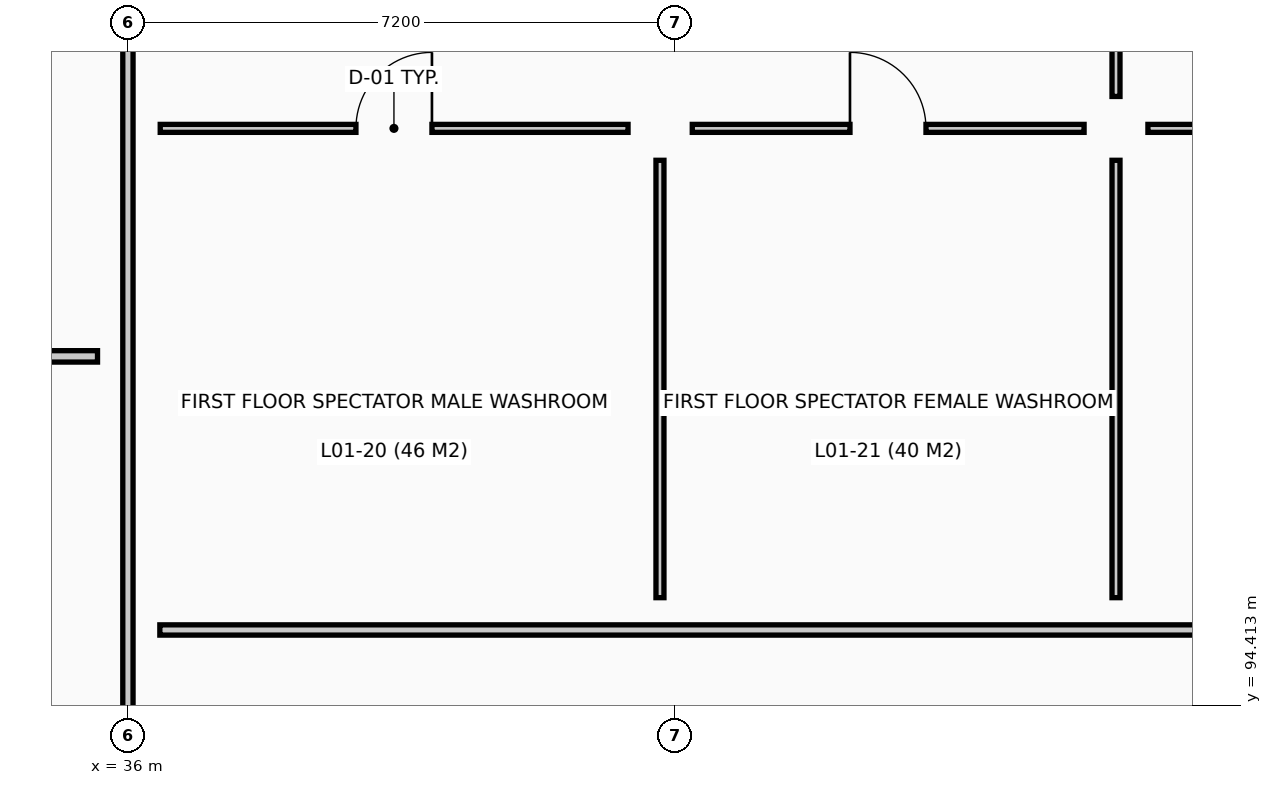
"""IFC4 building model, lengths in metres.
Left out: names, types, materials, properties, quantities, classifications, styles, units other than length and angle.
Written with IfcOpenShell. Run it as: python <this file> out.ifc"""

import sys

from ifc_helpers import new_model, si_unit, direction, frame, frame_2d, origin, place, context, subcontext, project, spatial, rectangle, extrude, element, fill, save


model = new_model("IFC4")
c1 = context("Model", 3, precision=1e-05, world=origin(), true_north=direction((0.0, 1.0)))
c2 = subcontext(c1, "Body", "Model", "MODEL_VIEW")
j1 = project(units=[si_unit("LENGTHUNIT", "METRE"), si_unit("PLANEANGLEUNIT", "RADIAN")], contexts=[c1])
p1 = place(None, origin())
s1 = spatial("IfcSite", under=j1, at=p1, CompositionType="ELEMENT")
p2 = place(p1, origin())
s2 = spatial("IfcBuilding", under=s1, at=p2, CompositionType="ELEMENT")
p3 = place(p2, frame((0.0, 0.0, 4.8)))
s3 = spatial("IfcBuildingStorey", under=s2, at=p3, CompositionType="ELEMENT", Elevation=4.8)
p4 = place(p3, frame((36.0, 90.82, 0.0), z_axis=(0.0, 0.0, 1.0), x_axis=(0.0, 1.0, 0.0)))
e1 = element("IfcWall", 1, at=p4, inside=s3, PredefinedType="PARTITIONING", context=c2, shape_type="SweptSolid", body=[
    extrude(rectangle(XDim=18.76, YDim=0.135, at=frame_2d((9.38, 0.0))), origin(), (0.0, 0.0, 1.0), 3.89),
])
p5 = place(p3, frame((36.42, 95.4, 0.0), z_axis=(0.0, 0.0, 1.0), x_axis=(1.0, 0.0, 0.0)))
e2 = element("IfcWall", 2, at=p5, inside=s3, PredefinedType="PARTITIONING", context=c2, shape_type="SweptSolid", body=[
    extrude(rectangle(XDim=15.16, YDim=0.135, at=frame_2d((7.58, 0.0))), origin(), (0.0, 0.0, 1.0), 4.545),
])
p6 = place(p3, frame((36.425, 102.0, 0.0), z_axis=(0.0, 0.0, 1.0), x_axis=(1.0, 0.0, 0.0)))
e3 = element("IfcWall", 3, at=p6, inside=s3, PredefinedType="PARTITIONING", context=c2, shape_type="SweptSolid", body=[
    extrude(rectangle(XDim=6.155, YDim=0.105, at=frame_2d((3.078, 0.0))), origin(), (0.0, 0.0, 1.0), 4.545),
])
p7 = place(p6, frame((2.575, 0.0, 0.0)))
e4 = element("IfcOpeningElement", 4, at=p7, cuts=e3, PredefinedType="OPENING", context=c2, shape_type="SweptSolid", body=[
    extrude(rectangle(XDim=1.0, YDim=2.1, at=frame_2d((0.5, 1.05))), frame((0.0, 0.062, 0.0), z_axis=(0.0, -1.0, 0.0), x_axis=(1.0, 0.0, 0.0)), (0.0, 0.0, 1.0), 0.125),
])
p8 = place(p3, frame((43.0, 95.825, 0.0), z_axis=(0.0, 0.0, 1.0), x_axis=(0.0, 1.0, 0.0)))
e5 = element("IfcWall", 5, at=p8, inside=s3, PredefinedType="PARTITIONING", context=c2, shape_type="SweptSolid", body=[
    extrude(rectangle(XDim=5.755, YDim=0.105, at=frame_2d((2.877, 0.0))), origin(), (0.0, 0.0, 1.0), 3.89),
])
p9 = place(p3, frame((43.425, 102.0, 0.0), z_axis=(0.0, 0.0, 1.0), x_axis=(1.0, 0.0, 0.0)))
e6 = element("IfcWall", 6, at=p9, inside=s3, PredefinedType="PARTITIONING", context=c2, shape_type="SweptSolid", body=[
    extrude(rectangle(XDim=5.155, YDim=0.105, at=frame_2d((2.578, 0.0))), origin(), (0.0, 0.0, 1.0), 4.545),
])
p10 = place(p9, frame((2.075, 0.0, 0.0)))
e7 = element("IfcOpeningElement", 7, at=p10, cuts=e6, PredefinedType="OPENING", context=c2, shape_type="SweptSolid", body=[
    extrude(rectangle(XDim=1.0, YDim=2.1, at=frame_2d((0.5, 1.05))), frame((0.0, 0.062, 0.0), z_axis=(0.0, -1.0, 0.0), x_axis=(1.0, 0.0, 0.0)), (0.0, 0.0, 1.0), 0.125),
])
p11 = place(p3, frame((49.0, 95.825, 0.0), z_axis=(0.0, 0.0, 1.0), x_axis=(0.0, 1.0, 0.0)))
e8 = element("IfcWall", 8, at=p11, inside=s3, PredefinedType="PARTITIONING", context=c2, shape_type="SweptSolid", body=[
    extrude(rectangle(XDim=5.755, YDim=0.105, at=frame_2d((2.877, 0.0))), origin(), (0.0, 0.0, 1.0), 4.545),
])
p12 = place(p3, frame((49.42, 102.0, 0.0), z_axis=(0.0, 0.0, 1.0), x_axis=(1.0, 0.0, 0.0)))
e9 = element("IfcWall", 9, at=p12, inside=s3, PredefinedType="PARTITIONING", context=c2, shape_type="SweptSolid", body=[
    extrude(rectangle(XDim=2.56, YDim=0.105, at=frame_2d((1.28, 0.0))), origin(), (0.0, 0.0, 1.0), 4.545),
])
p13 = place(p12, frame((0.755, 0.0, 0.0)))
e10 = element("IfcOpeningElement", 10, at=p13, cuts=e9, PredefinedType="OPENING", context=c2, shape_type="SweptSolid", body=[
    extrude(rectangle(XDim=1.05, YDim=2.15, at=frame_2d((0.525, 1.075))), frame((0.0, 0.062, 0.0), z_axis=(0.0, -1.0, 0.0), x_axis=(1.0, 0.0, 0.0)), (0.0, 0.0, 1.0), 0.125),
])
p14 = place(p3, frame((49.0, 102.42, 0.0), z_axis=(0.0, 0.0, 1.0), x_axis=(0.0, 1.0, 0.0)))
e11 = element("IfcWall", 11, at=p14, inside=s3, PredefinedType="PARTITIONING", context=c2, shape_type="SweptSolid", body=[
    extrude(rectangle(XDim=2.56, YDim=0.105, at=frame_2d((1.28, 0.0))), origin(), (0.0, 0.0, 1.0), 4.545),
])
p15 = place(p3, frame((15.0, 99.0, 0.0), z_axis=(0.0, 0.0, 1.0), x_axis=(1.0, 0.0, 0.0)))
e12 = element("IfcWall", 12, at=p15, inside=s3, PredefinedType="MOVABLE", context=c2, shape_type="SweptSolid", body=[
    extrude(rectangle(XDim=20.6, YDim=0.15, at=frame_2d((10.3, 0.0))), origin(), (0.0, 0.0, 1.0), 4.285),
])
p16 = place(p7, frame((1.0, 0.0, 0.0), z_axis=(0.0, 0.0, 1.0), x_axis=(-1.0, 0.0, 0.0)))
e13 = element("IfcDoor", 13, at=p16, inside=s3, OperationType="SINGLE_SWING_LEFT", PredefinedType="DOOR", context=c2, shape_type="SweptSolid", body=[
    extrude(rectangle(XDim=1.0, YDim=2.1, at=frame_2d((0.5, 1.05))), frame((0.0, 0.025, 0.0), z_axis=(0.0, -1.0, 0.0), x_axis=(1.0, 0.0, 0.0)), (0.0, 0.0, 1.0), 0.05),
])
fill(e4, e13)
p17 = place(p10, frame((1.0, 0.0, 0.0), z_axis=(0.0, 0.0, 1.0), x_axis=(-1.0, 0.0, 0.0)))
e14 = element("IfcDoor", 14, at=p17, inside=s3, OperationType="SINGLE_SWING_RIGHT", PredefinedType="DOOR", context=c2, shape_type="SweptSolid", body=[
    extrude(rectangle(XDim=1.0, YDim=2.1, at=frame_2d((0.5, 1.05))), frame((0.0, 0.025, 0.0), z_axis=(0.0, -1.0, 0.0), x_axis=(1.0, 0.0, 0.0)), (0.0, 0.0, 1.0), 0.05),
])
fill(e7, e14)
save(model, sys.argv[1])
